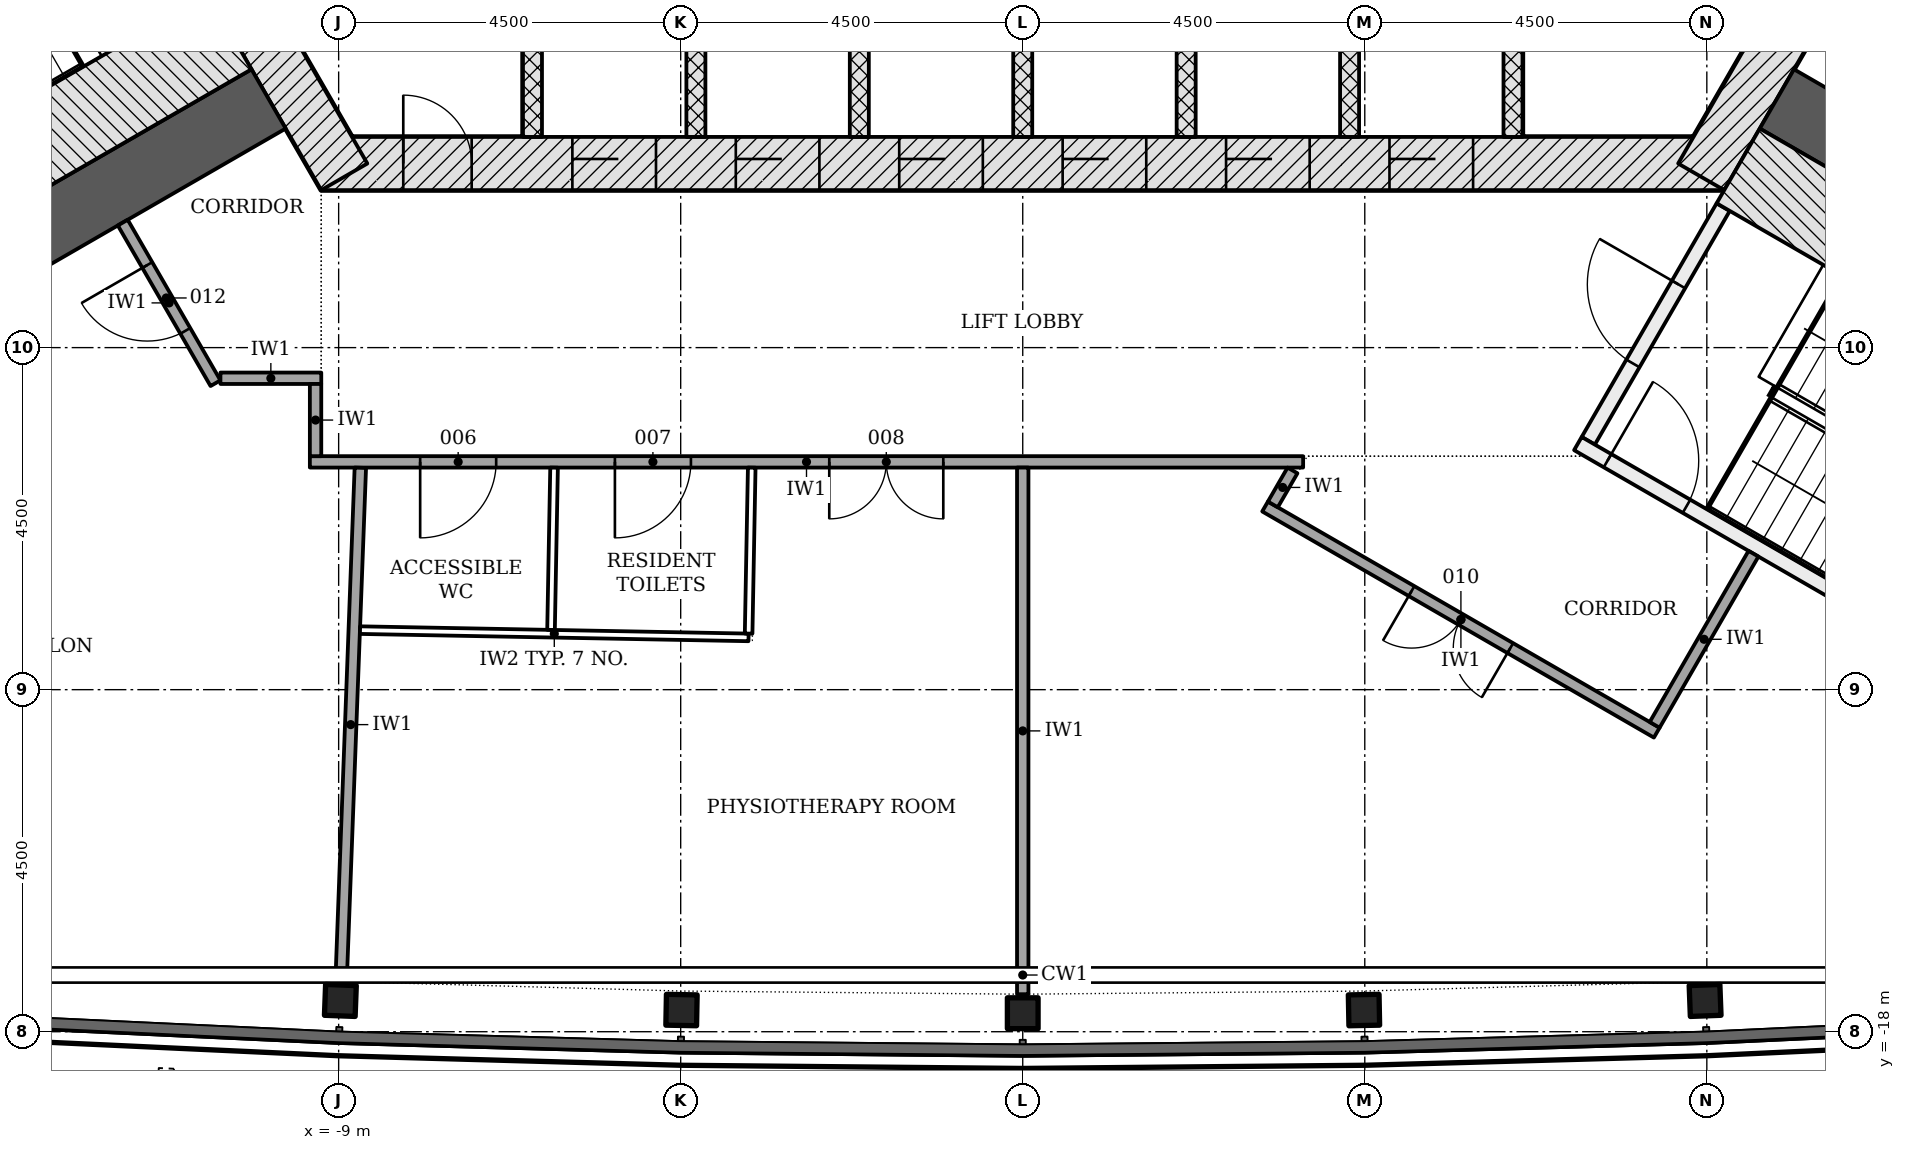
"""IFC4 building model, lengths in metres.
Left out: names, types, materials, properties, quantities, classifications, styles, units other than length and angle.
Written with IfcOpenShell. Run it as: python <this file> out.ifc"""

import sys

from ifc_helpers import new_model, si_unit, direction, frame, frame_2d, origin, origin_2d, place, context, subcontext, project, spatial, rectangle, i_section, extrude, element, fill, save


model = new_model("IFC4")
c1 = context("Model", 3, precision=1e-05, world=origin(), true_north=direction((0.0, 1.0)))
c2 = subcontext(c1, "Body", "Model", "MODEL_VIEW")
j1 = project(units=[si_unit("LENGTHUNIT", "METRE"), si_unit("PLANEANGLEUNIT", "RADIAN")], contexts=[c1])
p1 = place(None, origin())
s1 = spatial("IfcSite", under=j1, at=p1, CompositionType="ELEMENT")
p2 = place(p1, origin())
s2 = spatial("IfcBuilding", under=s1, at=p2, CompositionType="ELEMENT")
p3 = place(p2, frame((0.0, 0.0, 34.8)))
s3 = spatial("IfcBuildingStorey", under=s2, at=p3, CompositionType="ELEMENT", Elevation=34.8)
p4 = place(p3, frame((-9.229, -6.578, -0.2), z_axis=(0.0, 0.0, 1.0), x_axis=(1.0, 0.0, 0.0)))
e1 = element("IfcWall", 1, at=p4, inside=s3, PredefinedType="SHEAR", context=c2, shape_type="SweptSolid", body=[
    extrude(rectangle(XDim=18.458, YDim=0.7, at=frame_2d((9.229, 0.0))), origin(), (0.0, 0.0, 1.0), 3.6),
])
p5 = place(p4, frame((3.304, 0.0, 0.2)))
e2 = element("IfcOpeningElement", 2, at=p5, cuts=e1, PredefinedType="OPENING", context=c2, shape_type="SweptSolid", body=[
    extrude(rectangle(XDim=1.1, YDim=2.1, at=frame_2d((0.55, 1.05))), frame((0.0, 0.36, 0.0), z_axis=(0.0, -1.0, 0.0), x_axis=(1.0, 0.0, 0.0)), (0.0, 0.0, 1.0), 0.72),
])
p6 = place(p4, frame((5.454, 0.0, 0.2)))
e3 = element("IfcOpeningElement", 3, at=p6, cuts=e1, PredefinedType="OPENING", context=c2, shape_type="SweptSolid", body=[
    extrude(rectangle(XDim=1.1, YDim=2.1, at=frame_2d((0.55, 1.05))), frame((0.0, 0.36, 0.0), z_axis=(0.0, -1.0, 0.0), x_axis=(1.0, 0.0, 0.0)), (0.0, 0.0, 1.0), 0.72),
])
p7 = place(p4, frame((7.604, 0.0, 0.2)))
e4 = element("IfcOpeningElement", 4, at=p7, cuts=e1, PredefinedType="OPENING", context=c2, shape_type="SweptSolid", body=[
    extrude(rectangle(XDim=1.1, YDim=2.1, at=frame_2d((0.55, 1.05))), frame((0.0, 0.36, 0.0), z_axis=(0.0, -1.0, 0.0), x_axis=(1.0, 0.0, 0.0)), (0.0, 0.0, 1.0), 0.72),
])
p8 = place(p4, frame((9.754, 0.0, 0.2)))
e5 = element("IfcOpeningElement", 5, at=p8, cuts=e1, PredefinedType="OPENING", context=c2, shape_type="SweptSolid", body=[
    extrude(rectangle(XDim=1.1, YDim=2.1, at=frame_2d((0.55, 1.05))), frame((0.0, 0.36, 0.0), z_axis=(0.0, -1.0, 0.0), x_axis=(1.0, 0.0, 0.0)), (0.0, 0.0, 1.0), 0.72),
])
p9 = place(p4, frame((11.904, 0.0, 0.2)))
e6 = element("IfcOpeningElement", 6, at=p9, cuts=e1, PredefinedType="OPENING", context=c2, shape_type="SweptSolid", body=[
    extrude(rectangle(XDim=1.1, YDim=2.1, at=frame_2d((0.55, 1.05))), frame((0.0, 0.36, 0.0), z_axis=(0.0, -1.0, 0.0), x_axis=(1.0, 0.0, 0.0)), (0.0, 0.0, 1.0), 0.72),
])
p10 = place(p4, frame((14.054, 0.0, 0.2)))
e7 = element("IfcOpeningElement", 7, at=p10, cuts=e1, PredefinedType="OPENING", context=c2, shape_type="SweptSolid", body=[
    extrude(rectangle(XDim=1.1, YDim=2.1, at=frame_2d((0.55, 1.05))), frame((0.0, 0.36, 0.0), z_axis=(0.0, -1.0, 0.0), x_axis=(1.0, 0.0, 0.0)), (0.0, 0.0, 1.0), 0.72),
])
p11 = place(p4, frame((1.079, 0.0, 0.2)))
e8 = element("IfcOpeningElement", 8, at=p11, cuts=e1, PredefinedType="OPENING", context=c2, shape_type="SweptSolid", body=[
    extrude(rectangle(XDim=0.9, YDim=2.1, at=frame_2d((0.45, 1.05))), frame((0.0, 0.36, 0.0), z_axis=(0.0, -1.0, 0.0), x_axis=(1.0, 0.0, 0.0)), (0.0, 0.0, 1.0), 0.72),
])
for number, where, z_axis, x_axis in (
    (9, (8.926, -6.753, -0.2), (0.0, 0.0, 1.0), (0.5, 0.866, 0.0)),
    (10, (-10.311, -4.353, -0.2), (0.0, 0.0, 1.0), (0.5, -0.866, 0.0)),
):
    element("IfcWall", number, at=place(p3, frame(where, z_axis=z_axis, x_axis=x_axis)), inside=s3, PredefinedType="SHEAR", context=c2, shape_type="SweptSolid", body=[
        extrude(rectangle(XDim=2.771, YDim=0.7, at=frame_2d((1.386, 0.0))), origin(), (0.0, 0.0, 1.0), 3.6),
    ])
for number, where, z_axis, x_axis in (
    (11, (-9.922, -5.728, -0.2), (0.0, 0.0, 1.0), (-0.866, -0.5, 0.0)),
    (12, (9.922, -5.728, -0.2), (0.0, 0.0, 1.0), (0.866, -0.5, 0.0)),
):
    element("IfcWall", number, at=place(p3, frame(where, z_axis=z_axis, x_axis=x_axis)), inside=s3, PredefinedType="SHEAR", context=c2, shape_type="SweptSolid", body=[
        extrude(rectangle(XDim=14.309, YDim=0.9, at=frame_2d((7.154, 0.0))), origin(), (0.0, 0.0, 1.0), 3.6),
    ])
for number, where, z_axis, x_axis in (
    (13, (-8.977, -17.589, -0.2), (0.0, 0.0, 1.0), (0.999, -0.037, 0.0)),
    (14, (-4.49, -17.715, -0.2), (0.0, 0.0, 1.0), (1.0, -0.019, 0.0)),
    (15, (0.0, -17.757, -0.2), (0.0, 0.0, 1.0), (1.0, 0.0, 0.0)),
    (16, (4.49, -17.715, -0.2), (0.0, 0.0, 1.0), (1.0, 0.019, 0.0)),
    (17, (8.977, -17.589, -0.2), (0.0, 0.0, 1.0), (0.999, 0.037, 0.0)),
):
    element("IfcColumn", number, at=place(p3, frame(where, z_axis=z_axis, x_axis=x_axis)), inside=s3, PredefinedType="COLUMN", context=c2, shape_type="SweptSolid", body=[
        extrude(i_section(OverallWidth=0.404, OverallDepth=0.406, WebThickness=0.027, FlangeThickness=0.044, FilletRadius=0.015, at=origin_2d()), origin(), (0.0, 0.0, 1.0), 3.6),
    ])
for number, where, z_axis, x_axis in (
    (18, (-6.45, -6.228, -0.2), (0.0, 0.0, 1.0), (0.0, 1.0, 0.0)),
    (19, (-4.3, -6.228, -0.2), (0.0, 0.0, 1.0), (0.0, 1.0, 0.0)),
    (20, (-2.15, -6.228, -0.2), (0.0, 0.0, 1.0), (0.0, 1.0, 0.0)),
    (21, (0.0, -6.228, -0.2), (0.0, 0.0, 1.0), (0.0, 1.0, 0.0)),
    (22, (2.15, -6.228, -0.2), (0.0, 0.0, 1.0), (0.0, 1.0, 0.0)),
    (23, (4.3, -6.228, -0.2), (0.0, 0.0, 1.0), (0.0, 1.0, 0.0)),
    (24, (6.45, -6.228, -0.2), (0.0, 0.0, 1.0), (0.0, 1.0, 0.0)),
):
    element("IfcWall", number, at=place(p3, frame(where, z_axis=z_axis, x_axis=x_axis)), inside=s3, PredefinedType="PARTITIONING", context=c2, shape_type="SweptSolid", body=[
        extrude(rectangle(XDim=2.5, YDim=0.25, at=frame_2d((1.25, 0.0))), origin(), (0.0, 0.0, 1.0), 3.6),
    ])
p12 = place(p3, frame((-10.43, -4.847, -0.2), z_axis=(0.0, 0.0, 1.0), x_axis=(-0.866018442252, -0.500012057535, 0.0)))
e25 = element("IfcWall", 25, at=p12, inside=s3, PredefinedType="SHEAR", context=c2, shape_type="SweptSolid", body=[
    extrude(rectangle(XDim=7.2, YDim=1.136, at=frame_2d((3.6, 0.0))), origin(), (0.0, 0.0, 1.0), 3.6),
])
p13 = place(p3, frame((7.44, -10.226, -0.2), z_axis=(0.0, 0.0, 1.0), x_axis=(0.500022077904, 0.866012656725, 0.0)))
e26 = element("IfcWall", 26, at=p13, inside=s3, PredefinedType="SHEAR", context=c2, shape_type="SweptSolid", body=[
    extrude(rectangle(XDim=3.55, YDim=0.2, at=frame_2d((1.775, 0.0))), origin(), (0.0, 0.0, 1.0), 3.6),
])
p14 = place(p13, frame((1.175, 0.0, 0.2)))
e27 = element("IfcOpeningElement", 27, at=p14, cuts=e26, PredefinedType="OPENING", context=c2, shape_type="SweptSolid", body=[
    extrude(rectangle(XDim=1.2, YDim=2.1, at=frame_2d((0.6, 1.05))), frame((0.0, 0.11, 0.0), z_axis=(0.0, -1.0, 0.0), x_axis=(1.0, 0.0, 0.0)), (0.0, 0.0, 1.0), 0.22),
])
p15 = place(p3, frame((7.304, -10.262, -0.2), z_axis=(0.0, 0.0, 1.0), x_axis=(0.866026594901, -0.49999793692, 0.0)))
e28 = element("IfcWall", 28, at=p15, inside=s3, PredefinedType="SHEAR", context=c2, shape_type="SweptSolid", body=[
    extrude(rectangle(XDim=5.6, YDim=0.2, at=frame_2d((2.8, 0.0))), origin(), (0.0, 0.0, 1.0), 3.6),
])
p16 = place(p15, frame((0.45, 0.0, 0.2)))
e29 = element("IfcOpeningElement", 29, at=p16, cuts=e28, PredefinedType="OPENING", context=c2, shape_type="SweptSolid", body=[
    extrude(rectangle(XDim=1.2, YDim=2.1, at=frame_2d((0.6, 1.05))), frame((0.0, 0.11, 0.0), z_axis=(0.0, -1.0, 0.0), x_axis=(1.0, 0.0, 0.0)), (0.0, 0.0, 1.0), 0.22),
])
p17 = place(p3, frame((9.413, -6.61, -0.2), z_axis=(0.0, 0.0, 1.0), x_axis=(0.866018442252, -0.500012057535, 0.0)))
e30 = element("IfcWall", 30, at=p17, inside=s3, PredefinedType="SHEAR", context=c2, shape_type="SweptSolid", body=[
    extrude(rectangle(XDim=7.2, YDim=1.136, at=frame_2d((3.6, 0.0))), origin(), (0.0, 0.0, 1.0), 3.6),
])
p18 = place(p3, frame((3.689, -10.503, 0.0), z_axis=(0.0, 0.0, 1.0), x_axis=(-1.0, 0.0, 0.0)))
e31 = element("IfcWall", 31, at=p18, inside=s3, PredefinedType="PARTITIONING", context=c2, shape_type="SweptSolid", body=[
    extrude(rectangle(XDim=13.068, YDim=0.15, at=frame_2d((6.534, 0.0))), origin(), (0.0, 0.0, 1.0), 2.768),
])
p19 = place(p18, frame((10.617, 0.0, 0.0)))
e32 = element("IfcOpeningElement", 32, at=p19, cuts=e31, PredefinedType="OPENING", context=c2, shape_type="SweptSolid", body=[
    extrude(rectangle(XDim=1.0, YDim=2.1, at=frame_2d((0.5, 1.05))), frame((0.0, 0.085, 0.0), z_axis=(0.0, -1.0, 0.0), x_axis=(1.0, 0.0, 0.0)), (0.0, 0.0, 1.0), 0.17),
])
p20 = place(p18, frame((8.054, 0.0, 0.0)))
e33 = element("IfcOpeningElement", 33, at=p20, cuts=e31, PredefinedType="OPENING", context=c2, shape_type="SweptSolid", body=[
    extrude(rectangle(XDim=1.0, YDim=2.1, at=frame_2d((0.5, 1.05))), frame((0.0, 0.085, 0.0), z_axis=(0.0, -1.0, 0.0), x_axis=(1.0, 0.0, 0.0)), (0.0, 0.0, 1.0), 0.17),
])
p21 = place(p18, frame((4.734, 0.0, 0.0)))
e34 = element("IfcOpeningElement", 34, at=p21, cuts=e31, PredefinedType="OPENING", context=c2, shape_type="SweptSolid", body=[
    extrude(rectangle(XDim=1.5, YDim=2.1, at=frame_2d((0.75, 1.05))), frame((0.0, 0.085, 0.0), z_axis=(0.0, -1.0, 0.0), x_axis=(1.0, 0.0, 0.0)), (0.0, 0.0, 1.0), 0.17),
])
p22 = place(p3, frame((8.341, -14.066, 0.0), z_axis=(0.0, 0.0, 1.0), x_axis=(-0.866017493347, 0.500013701029, 0.0)))
e35 = element("IfcWall", 35, at=p22, inside=s3, PredefinedType="PARTITIONING", context=c2, shape_type="SweptSolid", body=[
    extrude(rectangle(XDim=5.95, YDim=0.15, at=frame_2d((2.975, 0.0))), origin(), (0.0, 0.0, 1.0), 2.768),
])
p23 = place(p22, frame((2.225, 0.0, 0.0)))
e36 = element("IfcOpeningElement", 36, at=p23, cuts=e35, PredefinedType="OPENING", context=c2, shape_type="SweptSolid", body=[
    extrude(rectangle(XDim=1.5, YDim=2.1, at=frame_2d((0.75, 1.05))), frame((0.0, 0.085, 0.0), z_axis=(0.0, -1.0, 0.0), x_axis=(1.0, 0.0, 0.0)), (0.0, 0.0, 1.0), 0.17),
])
p24 = place(p3, frame((8.314, -13.963, 0.0), z_axis=(0.0, 0.0, 1.0), x_axis=(0.499936506574, 0.866062058628, 0.0)))
e37 = element("IfcWall", 37, at=p24, inside=s3, PredefinedType="PARTITIONING", context=c2, shape_type="SweptSolid", body=[
    extrude(rectangle(XDim=2.6, YDim=0.15, at=frame_2d((1.3, 0.0))), origin(), (0.0, 0.0, 1.0), 2.923),
])
p25 = place(p3, frame((-10.62, -9.468, 0.0), z_axis=(0.0, 0.0, 1.0), x_axis=(-0.500045838785, 0.865998937132, 0.0)))
e38 = element("IfcWall", 38, at=p25, inside=s3, PredefinedType="PARTITIONING", context=c2, shape_type="SweptSolid", body=[
    extrude(rectangle(XDim=2.44, YDim=0.15, at=frame_2d((1.22, 0.0))), origin(), (0.0, 0.0, 1.0), 3.4),
])
p26 = place(p25, frame((0.795, 0.0, 0.0)))
e39 = element("IfcOpeningElement", 39, at=p26, cuts=e38, PredefinedType="OPENING", context=c2, shape_type="SweptSolid", body=[
    extrude(rectangle(XDim=1.0, YDim=2.1, at=frame_2d((0.5, 1.05))), frame((0.0, 0.085, 0.0), z_axis=(0.0, -1.0, 0.0), x_axis=(1.0, 0.0, 0.0)), (0.0, 0.0, 1.0), 0.17),
])
p27 = place(p3, frame((-10.555, -9.403, 0.0), z_axis=(0.0, 0.0, 1.0), x_axis=(1.0, 0.0, 0.0)))
e40 = element("IfcWall", 40, at=p27, inside=s3, PredefinedType="PARTITIONING", context=c2, shape_type="SweptSolid", body=[
    extrude(rectangle(XDim=1.326, YDim=0.15, at=frame_2d((0.663, 0.0))), origin(), (0.0, 0.0, 1.0), 3.4),
])
p28 = place(p3, frame((-9.304, -10.428, 0.0), z_axis=(0.0, 0.0, 1.0), x_axis=(0.0, 1.0, 0.0)))
e41 = element("IfcWall", 41, at=p28, inside=s3, PredefinedType="PARTITIONING", context=c2, shape_type="SweptSolid", body=[
    extrude(rectangle(XDim=0.95, YDim=0.15, at=frame_2d((0.475, 0.0))), origin(), (0.0, 0.0, 1.0), 3.4),
])
p29 = place(p3, frame((3.291, -11.063, 0.0), z_axis=(0.0, 0.0, 1.0), x_axis=(0.499899694197, 0.866083307622, 0.0)))
e42 = element("IfcWall", 42, at=p29, inside=s3, PredefinedType="PARTITIONING", context=c2, shape_type="SweptSolid", body=[
    extrude(rectangle(XDim=0.517, YDim=0.15, at=frame_2d((0.258, 0.0))), origin(), (0.0, 0.0, 1.0), 3.4),
])
p30 = place(p3, frame((0.0, -17.507, 0.0), z_axis=(0.0, 0.0, 1.0), x_axis=(0.0, 1.0, 0.0)))
e43 = element("IfcWall", 43, at=p30, inside=s3, PredefinedType="PARTITIONING", context=c2, shape_type="SweptSolid", body=[
    extrude(rectangle(XDim=6.929, YDim=0.15, at=frame_2d((3.464, 0.0))), origin(), (0.0, 0.0, 1.0), 2.768),
])
p31 = place(p3, frame((-8.968, -17.339, 0.0), z_axis=(0.0, 0.0, 1.0), x_axis=(0.037473660589, 0.999297615709, 0.0)))
e44 = element("IfcWall", 44, at=p31, inside=s3, PredefinedType="PARTITIONING", context=c2, shape_type="SweptSolid", body=[
    extrude(rectangle(XDim=6.762, YDim=0.15, at=frame_2d((3.381, 0.0))), origin(), (0.0, 0.0, 1.0), 2.778),
])
p32 = place(p3, frame((-8.719, -12.717, 0.0), z_axis=(0.0, 0.0, 1.0), x_axis=(0.999824773789, -0.018719554441, 0.0)))
e45 = element("IfcWall", 45, at=p32, inside=s3, PredefinedType="PARTITIONING", context=c2, shape_type="SweptSolid", body=[
    extrude(rectangle(XDim=5.113, YDim=0.1, at=frame_2d((2.556, 0.0))), origin(), (0.0, 0.0, 1.0), 2.768),
])
p33 = place(p3, frame((-3.606, -12.762, 0.0), z_axis=(0.0, 0.0, 1.0), x_axis=(0.018670568063, 0.999825689752, 0.0)))
e46 = element("IfcWall", 46, at=p33, inside=s3, PredefinedType="PARTITIONING", context=c2, shape_type="SweptSolid", body=[
    extrude(rectangle(XDim=2.184, YDim=0.1, at=frame_2d((1.092, 0.0))), origin(), (0.0, 0.0, 1.0), 3.4),
])
p34 = place(p3, frame((-6.206, -12.714, 0.0), z_axis=(0.0, 0.0, 1.0), x_axis=(0.018638115979, 0.99982629523, 0.0)))
e47 = element("IfcWall", 47, at=p34, inside=s3, PredefinedType="PARTITIONING", context=c2, shape_type="SweptSolid", body=[
    extrude(rectangle(XDim=2.135, YDim=0.1, at=frame_2d((1.068, 0.0))), origin(), (0.0, 0.0, 1.0), 3.4),
])
p35 = place(p5, origin())
e48 = element("IfcDoor", 48, at=p35, inside=s3, OperationType="DOUBLE_DOOR_SLIDING", PredefinedType="DOOR", context=c2, shape_type="SweptSolid", body=[
    extrude(rectangle(XDim=1.1, YDim=2.1, at=frame_2d((0.55, 1.05))), frame((0.0, 0.025, 0.0), z_axis=(0.0, -1.0, 0.0), x_axis=(1.0, 0.0, 0.0)), (0.0, 0.0, 1.0), 0.05),
])
fill(e2, e48)
p36 = place(p6, origin())
e49 = element("IfcDoor", 49, at=p36, inside=s3, OperationType="DOUBLE_DOOR_SLIDING", PredefinedType="DOOR", context=c2, shape_type="SweptSolid", body=[
    extrude(rectangle(XDim=1.1, YDim=2.1, at=frame_2d((0.55, 1.05))), frame((0.0, 0.025, 0.0), z_axis=(0.0, -1.0, 0.0), x_axis=(1.0, 0.0, 0.0)), (0.0, 0.0, 1.0), 0.05),
])
fill(e3, e49)
p37 = place(p7, origin())
e50 = element("IfcDoor", 50, at=p37, inside=s3, OperationType="DOUBLE_DOOR_SLIDING", PredefinedType="DOOR", context=c2, shape_type="SweptSolid", body=[
    extrude(rectangle(XDim=1.1, YDim=2.1, at=frame_2d((0.55, 1.05))), frame((0.0, 0.025, 0.0), z_axis=(0.0, -1.0, 0.0), x_axis=(1.0, 0.0, 0.0)), (0.0, 0.0, 1.0), 0.05),
])
fill(e4, e50)
p38 = place(p8, origin())
e51 = element("IfcDoor", 51, at=p38, inside=s3, OperationType="DOUBLE_DOOR_SLIDING", PredefinedType="DOOR", context=c2, shape_type="SweptSolid", body=[
    extrude(rectangle(XDim=1.1, YDim=2.1, at=frame_2d((0.55, 1.05))), frame((0.0, 0.025, 0.0), z_axis=(0.0, -1.0, 0.0), x_axis=(1.0, 0.0, 0.0)), (0.0, 0.0, 1.0), 0.05),
])
fill(e5, e51)
p39 = place(p9, origin())
e52 = element("IfcDoor", 52, at=p39, inside=s3, OperationType="DOUBLE_DOOR_SLIDING", PredefinedType="DOOR", context=c2, shape_type="SweptSolid", body=[
    extrude(rectangle(XDim=1.1, YDim=2.1, at=frame_2d((0.55, 1.05))), frame((0.0, 0.025, 0.0), z_axis=(0.0, -1.0, 0.0), x_axis=(1.0, 0.0, 0.0)), (0.0, 0.0, 1.0), 0.05),
])
fill(e6, e52)
p40 = place(p10, origin())
e53 = element("IfcDoor", 53, at=p40, inside=s3, OperationType="DOUBLE_DOOR_SLIDING", PredefinedType="DOOR", context=c2, shape_type="SweptSolid", body=[
    extrude(rectangle(XDim=1.1, YDim=2.1, at=frame_2d((0.55, 1.05))), frame((0.0, 0.025, 0.0), z_axis=(0.0, -1.0, 0.0), x_axis=(1.0, 0.0, 0.0)), (0.0, 0.0, 1.0), 0.05),
])
fill(e7, e53)
p41 = place(p11, origin())
e54 = element("IfcDoor", 54, at=p41, inside=s3, OperationType="SINGLE_SWING_LEFT", PredefinedType="DOOR", context=c2, shape_type="SweptSolid", body=[
    extrude(rectangle(XDim=0.9, YDim=2.1, at=frame_2d((0.45, 1.05))), frame((0.0, 0.075, 0.0), z_axis=(0.0, -1.0, 0.0), x_axis=(1.0, 0.0, 0.0)), (0.0, 0.0, 1.0), 0.15),
])
fill(e8, e54)
p42 = place(p14, origin())
e55 = element("IfcDoor", 55, at=p42, inside=s3, OperationType="SINGLE_SWING_RIGHT", PredefinedType="DOOR", context=c2, shape_type="SweptSolid", body=[
    extrude(rectangle(XDim=1.2, YDim=2.1, at=frame_2d((0.6, 1.05))), frame((0.0, 0.025, 0.0), z_axis=(0.0, -1.0, 0.0), x_axis=(1.0, 0.0, 0.0)), (0.0, 0.0, 1.0), 0.05),
])
fill(e27, e55)
p43 = place(p16, origin())
e56 = element("IfcDoor", 56, at=p43, inside=s3, OperationType="SINGLE_SWING_LEFT", PredefinedType="DOOR", context=c2, shape_type="SweptSolid", body=[
    extrude(rectangle(XDim=1.2, YDim=2.1, at=frame_2d((0.6, 1.05))), frame((0.0, 0.025, 0.0), z_axis=(0.0, -1.0, 0.0), x_axis=(1.0, 0.0, 0.0)), (0.0, 0.0, 1.0), 0.05),
])
fill(e29, e56)
p44 = place(p19, origin())
e57 = element("IfcDoor", 57, at=p44, inside=s3, OperationType="SINGLE_SWING_RIGHT", PredefinedType="DOOR", context=c2, shape_type="SweptSolid", body=[
    extrude(rectangle(XDim=1.0, YDim=2.1, at=frame_2d((0.5, 1.05))), frame((0.0, 0.025, 0.0), z_axis=(0.0, -1.0, 0.0), x_axis=(1.0, 0.0, 0.0)), (0.0, 0.0, 1.0), 0.05),
])
fill(e32, e57)
p45 = place(p20, origin())
e58 = element("IfcDoor", 58, at=p45, inside=s3, OperationType="SINGLE_SWING_RIGHT", PredefinedType="DOOR", context=c2, shape_type="SweptSolid", body=[
    extrude(rectangle(XDim=1.0, YDim=2.1, at=frame_2d((0.5, 1.05))), frame((0.0, 0.025, 0.0), z_axis=(0.0, -1.0, 0.0), x_axis=(1.0, 0.0, 0.0)), (0.0, 0.0, 1.0), 0.05),
])
fill(e33, e58)
p46 = place(p21, origin())
e59 = element("IfcDoor", 59, at=p46, inside=s3, OperationType="DOUBLE_DOOR_SINGLE_SWING", PredefinedType="DOOR", context=c2, shape_type="SweptSolid", body=[
    extrude(rectangle(XDim=1.5, YDim=2.1, at=frame_2d((0.75, 1.05))), frame((0.0, 0.025, 0.0), z_axis=(0.0, -1.0, 0.0), x_axis=(1.0, 0.0, 0.0)), (0.0, 0.0, 1.0), 0.05),
])
fill(e34, e59)
p47 = place(p23, origin())
e60 = element("IfcDoor", 60, at=p47, inside=s3, OperationType="DOUBLE_DOOR_SINGLE_SWING", PredefinedType="DOOR", context=c2, shape_type="SweptSolid", body=[
    extrude(rectangle(XDim=1.5, YDim=2.1, at=frame_2d((0.75, 1.05))), frame((0.0, 0.025, 0.0), z_axis=(0.0, -1.0, 0.0), x_axis=(1.0, 0.0, 0.0)), (0.0, 0.0, 1.0), 0.05),
])
fill(e36, e60)
p48 = place(p26, origin())
e61 = element("IfcDoor", 61, at=p48, inside=s3, OperationType="SINGLE_SWING_RIGHT", PredefinedType="DOOR", context=c2, shape_type="SweptSolid", body=[
    extrude(rectangle(XDim=1.0, YDim=2.1, at=frame_2d((0.5, 1.05))), frame((0.0, 0.025, 0.0), z_axis=(0.0, -1.0, 0.0), x_axis=(1.0, 0.0, 0.0)), (0.0, 0.0, 1.0), 0.05),
])
fill(e39, e61)
save(model, sys.argv[1])
